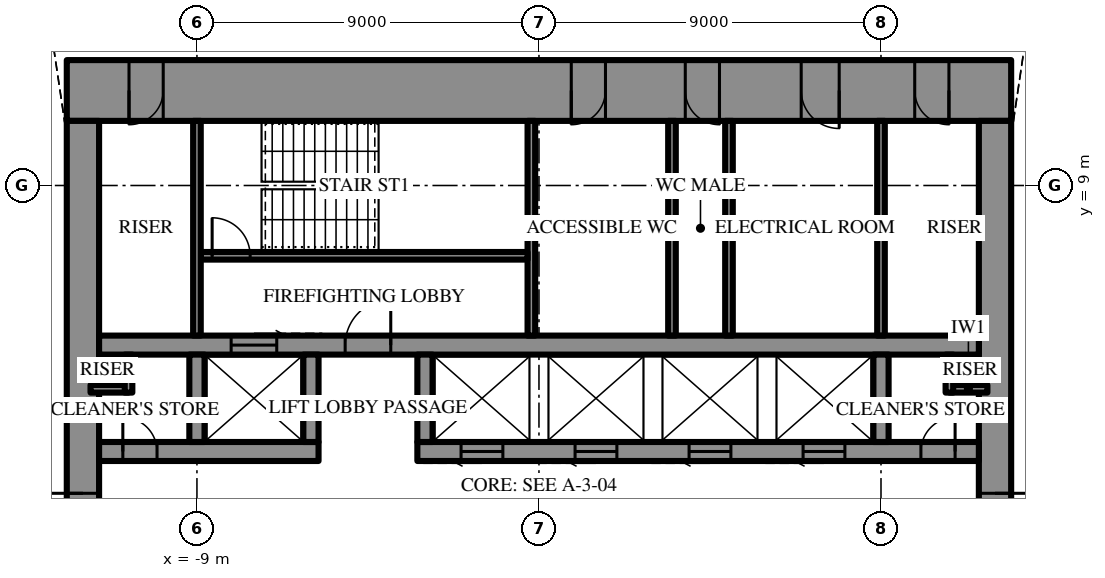
"""IFC4 building model, lengths in metres.
Left out: names, types, materials, properties, quantities, classifications, styles, units other than length and angle.
Written with IfcOpenShell. Run it as: python <this file> out.ifc"""

import sys

from ifc_helpers import new_model, si_unit, direction, frame, frame_2d, origin, place, context, subcontext, project, spatial, rectangle, extrude, element, fill, save


model = new_model("IFC4")
c1 = context("Model", 3, precision=1e-05, world=origin(), true_north=direction((0.0, 1.0)))
c2 = subcontext(c1, "Body", "Model", "MODEL_VIEW")
j1 = project(units=[si_unit("LENGTHUNIT", "METRE"), si_unit("PLANEANGLEUNIT", "RADIAN")], contexts=[c1])
p1 = place(None, origin())
s1 = spatial("IfcSite", under=j1, at=p1, CompositionType="ELEMENT")
p2 = place(p1, origin())
s2 = spatial("IfcBuilding", under=s1, at=p2, CompositionType="ELEMENT")
p3 = place(p2, frame((0.0, 0.0, 332.5)))
s3 = spatial("IfcBuildingStorey", under=s2, at=p3, CompositionType="ELEMENT", Elevation=332.5)
p4 = place(p3, frame((-12.425, 11.5, 0.0), z_axis=(0.0, 0.0, 1.0), x_axis=(1.0, 0.0, 0.0)))
e1 = element("IfcWall", 1, at=p4, inside=s3, PredefinedType="SHEAR", context=c2, shape_type="SweptSolid", body=[
    extrude(rectangle(XDim=24.85, YDim=1.6, at=frame_2d((12.425, 0.0))), origin(), (0.0, 0.0, 1.0), 4.2),
])
p5 = place(p4, frame((13.275, 0.0, 0.0)))
e2 = element("IfcOpeningElement", 2, at=p5, cuts=e1, PredefinedType="OPENING", context=c2, shape_type="SweptSolid", body=[
    extrude(rectangle(XDim=0.9, YDim=2.2, at=frame_2d((0.45, 1.1))), frame((0.0, 0.81, 0.0), z_axis=(0.0, -1.0, 0.0), x_axis=(1.0, 0.0, 0.0)), (0.0, 0.0, 1.0), 1.62),
])
p6 = place(p4, frame((16.275, 0.0, 0.0)))
e3 = element("IfcOpeningElement", 3, at=p6, cuts=e1, PredefinedType="OPENING", context=c2, shape_type="SweptSolid", body=[
    extrude(rectangle(XDim=0.9, YDim=2.2, at=frame_2d((0.45, 1.1))), frame((0.0, 0.81, 0.0), z_axis=(0.0, -1.0, 0.0), x_axis=(1.0, 0.0, 0.0)), (0.0, 0.0, 1.0), 1.62),
])
p7 = place(p4, frame((19.325, 0.0, 0.0)))
e4 = element("IfcOpeningElement", 4, at=p7, cuts=e1, PredefinedType="OPENING", context=c2, shape_type="SweptSolid", body=[
    extrude(rectangle(XDim=1.0, YDim=2.2, at=frame_2d((0.5, 1.1))), frame((0.0, 0.81, 0.0), z_axis=(0.0, -1.0, 0.0), x_axis=(1.0, 0.0, 0.0)), (0.0, 0.0, 1.0), 1.62),
])
p8 = place(p4, frame((1.637, 0.0, 0.0)))
e5 = element("IfcOpeningElement", 5, at=p8, cuts=e1, PredefinedType="OPENING", context=c2, shape_type="SweptSolid", body=[
    extrude(rectangle(XDim=0.9, YDim=2.2, at=frame_2d((0.45, 1.1))), frame((0.0, 0.81, 0.0), z_axis=(0.0, -1.0, 0.0), x_axis=(1.0, 0.0, 0.0)), (0.0, 0.0, 1.0), 1.62),
])
p9 = place(p4, frame((22.312, 0.0, 0.0)))
e6 = element("IfcOpeningElement", 6, at=p9, cuts=e1, PredefinedType="OPENING", context=c2, shape_type="SweptSolid", body=[
    extrude(rectangle(XDim=0.9, YDim=2.2, at=frame_2d((0.45, 1.1))), frame((0.0, 0.81, 0.0), z_axis=(0.0, -1.0, 0.0), x_axis=(1.0, 0.0, 0.0)), (0.0, 0.0, 1.0), 1.62),
])
p10 = place(p3, frame((12.0, -10.7, 0.0), z_axis=(0.0, 0.0, 1.0), x_axis=(0.0, 1.0, 0.0)))
e7 = element("IfcWall", 7, at=p10, inside=s3, PredefinedType="SHEAR", context=c2, shape_type="SweptSolid", body=[
    extrude(rectangle(XDim=21.4, YDim=0.85, at=frame_2d((10.7, 0.0))), origin(), (0.0, 0.0, 1.0), 4.2),
])
p11 = place(p10, frame((9.8, 0.0, 0.0)))
e8 = element("IfcOpeningElement", 8, at=p11, cuts=e7, PredefinedType="OPENING", context=c2, shape_type="SweptSolid", body=[
    extrude(rectangle(XDim=1.8, YDim=2.4, at=frame_2d((0.9, 1.2))), frame((0.0, 0.435, 0.0), z_axis=(0.0, -1.0, 0.0), x_axis=(1.0, 0.0, 0.0)), (0.0, 0.0, 1.0), 0.87),
])
p12 = place(p3, frame((-12.0, 10.7, 0.0), z_axis=(0.0, 0.0, 1.0), x_axis=(0.0, -1.0, 0.0)))
e9 = element("IfcWall", 9, at=p12, inside=s3, PredefinedType="SHEAR", context=c2, shape_type="SweptSolid", body=[
    extrude(rectangle(XDim=21.4, YDim=0.85, at=frame_2d((10.7, 0.0))), origin(), (0.0, 0.0, 1.0), 4.2),
])
p13 = place(p12, frame((9.8, 0.0, 0.0)))
e10 = element("IfcOpeningElement", 10, at=p13, cuts=e9, PredefinedType="OPENING", context=c2, shape_type="SweptSolid", body=[
    extrude(rectangle(XDim=1.8, YDim=2.4, at=frame_2d((0.9, 1.2))), frame((0.0, 0.435, 0.0), z_axis=(0.0, -1.0, 0.0), x_axis=(1.0, 0.0, 0.0)), (0.0, 0.0, 1.0), 0.87),
])
p14 = place(p3, frame((-11.575, 2.0, 0.0), z_axis=(0.0, 0.0, 1.0), x_axis=(1.0, 0.0, 0.0)))
e11 = element("IfcWall", 11, at=p14, inside=s3, PredefinedType="SHEAR", context=c2, shape_type="SweptSolid", body=[
    extrude(rectangle(XDim=5.775, YDim=0.5, at=frame_2d((2.887, 0.0))), origin(), (0.0, 0.0, 1.0), 4.2),
])
p15 = place(p14, frame((0.625, 0.0, 0.0)))
e12 = element("IfcOpeningElement", 12, at=p15, cuts=e11, PredefinedType="OPENING", context=c2, shape_type="SweptSolid", body=[
    extrude(rectangle(XDim=0.9, YDim=2.2, at=frame_2d((0.45, 1.1))), frame((0.0, 0.26, 0.0), z_axis=(0.0, -1.0, 0.0), x_axis=(1.0, 0.0, 0.0)), (0.0, 0.0, 1.0), 0.52),
])
p16 = place(p3, frame((-3.2, 2.0, 0.0), z_axis=(0.0, 0.0, 1.0), x_axis=(1.0, 0.0, 0.0)))
e13 = element("IfcWall", 13, at=p16, inside=s3, PredefinedType="SHEAR", context=c2, shape_type="SweptSolid", body=[
    extrude(rectangle(XDim=14.775, YDim=0.5, at=frame_2d((7.387, 0.0))), origin(), (0.0, 0.0, 1.0), 4.2),
])
p17 = place(p16, frame((13.25, 0.0, 0.0)))
e14 = element("IfcOpeningElement", 14, at=p17, cuts=e13, PredefinedType="OPENING", context=c2, shape_type="SweptSolid", body=[
    extrude(rectangle(XDim=0.9, YDim=2.2, at=frame_2d((0.45, 1.1))), frame((0.0, 0.26, 0.0), z_axis=(0.0, -1.0, 0.0), x_axis=(1.0, 0.0, 0.0)), (0.0, 0.0, 1.0), 0.52),
])
p18 = place(p16, frame((1.15, 0.0, 0.0)))
e15 = element("IfcOpeningElement", 15, at=p18, cuts=e13, PredefinedType="OPENING", context=c2, shape_type="SweptSolid", body=[
    extrude(rectangle(XDim=1.1, YDim=2.2, at=frame_2d((0.55, 1.1))), frame((0.0, 0.26, 0.0), z_axis=(0.0, -1.0, 0.0), x_axis=(1.0, 0.0, 0.0)), (0.0, 0.0, 1.0), 0.52),
])
p19 = place(p16, frame((4.15, 0.0, 0.0)))
e16 = element("IfcOpeningElement", 16, at=p19, cuts=e13, PredefinedType="OPENING", context=c2, shape_type="SweptSolid", body=[
    extrude(rectangle(XDim=1.1, YDim=2.2, at=frame_2d((0.55, 1.1))), frame((0.0, 0.26, 0.0), z_axis=(0.0, -1.0, 0.0), x_axis=(1.0, 0.0, 0.0)), (0.0, 0.0, 1.0), 0.52),
])
p20 = place(p16, frame((7.15, 0.0, 0.0)))
e17 = element("IfcOpeningElement", 17, at=p20, cuts=e13, PredefinedType="OPENING", context=c2, shape_type="SweptSolid", body=[
    extrude(rectangle(XDim=1.1, YDim=2.2, at=frame_2d((0.55, 1.1))), frame((0.0, 0.26, 0.0), z_axis=(0.0, -1.0, 0.0), x_axis=(1.0, 0.0, 0.0)), (0.0, 0.0, 1.0), 0.52),
])
p21 = place(p16, frame((10.15, 0.0, 0.0)))
e18 = element("IfcOpeningElement", 18, at=p21, cuts=e13, PredefinedType="OPENING", context=c2, shape_type="SweptSolid", body=[
    extrude(rectangle(XDim=1.1, YDim=2.2, at=frame_2d((0.55, 1.1))), frame((0.0, 0.26, 0.0), z_axis=(0.0, -1.0, 0.0), x_axis=(1.0, 0.0, 0.0)), (0.0, 0.0, 1.0), 0.52),
])
p22 = place(p3, frame((-11.575, 4.8, 0.0), z_axis=(0.0, 0.0, 1.0), x_axis=(1.0, 0.0, 0.0)))
e19 = element("IfcWall", 19, at=p22, inside=s3, PredefinedType="SHEAR", context=c2, shape_type="SweptSolid", body=[
    extrude(rectangle(XDim=23.15, YDim=0.5, at=frame_2d((11.575, 0.0))), origin(), (0.0, 0.0, 1.0), 4.2),
])
p23 = place(p22, frame((6.475, 0.0, 0.0)))
e20 = element("IfcOpeningElement", 20, at=p23, cuts=e19, PredefinedType="OPENING", context=c2, shape_type="SweptSolid", body=[
    extrude(rectangle(XDim=1.2, YDim=2.2, at=frame_2d((0.6, 1.1))), frame((0.0, 0.26, 0.0), z_axis=(0.0, -1.0, 0.0), x_axis=(1.0, 0.0, 0.0)), (0.0, 0.0, 1.0), 0.52),
])
p24 = place(p22, frame((3.475, 0.0, 0.0)))
e21 = element("IfcOpeningElement", 21, at=p24, cuts=e19, PredefinedType="OPENING", context=c2, shape_type="SweptSolid", body=[
    extrude(rectangle(XDim=1.2, YDim=2.2, at=frame_2d((0.6, 1.1))), frame((0.0, 0.26, 0.0), z_axis=(0.0, -1.0, 0.0), x_axis=(1.0, 0.0, 0.0)), (0.0, 0.0, 1.0), 0.52),
])
for number, where, z_axis, x_axis in (
    (22, (-9.0, 2.25, 0.0), (0.0, 0.0, 1.0), (0.0, 1.0, 0.0)),
    (23, (-6.0, 2.25, 0.0), (0.0, 0.0, 1.0), (0.0, 1.0, 0.0)),
    (24, (-3.0, 2.25, 0.0), (0.0, 0.0, 1.0), (0.0, 1.0, 0.0)),
    (25, (9.0, 2.25, 0.0), (0.0, 0.0, 1.0), (0.0, 1.0, 0.0)),
):
    element("IfcWall", number, at=place(p3, frame(where, z_axis=z_axis, x_axis=x_axis)), inside=s3, PredefinedType="SHEAR", context=c2, shape_type="SweptSolid", body=[
        extrude(rectangle(XDim=2.3, YDim=0.4, at=frame_2d((1.15, 0.0))), origin(), (0.0, 0.0, 1.0), 4.2),
    ])
p25 = place(p3, frame((-0.2, 5.05, 0.0), z_axis=(0.0, 0.0, 1.0), x_axis=(0.0, 1.0, 0.0)))
e26 = element("IfcWall", 26, at=p25, inside=s3, PredefinedType="SHEAR", context=c2, shape_type="SweptSolid", body=[
    extrude(rectangle(XDim=5.65, YDim=0.2, at=frame_2d((2.825, 0.0))), origin(), (0.0, 0.0, 1.0), 4.2),
])
p26 = place(p3, frame((-8.9, 7.15, 0.0), z_axis=(0.0, 0.0, 1.0), x_axis=(1.0, 0.0, 0.0)))
e27 = element("IfcWall", 27, at=p26, inside=s3, PredefinedType="SHEAR", context=c2, shape_type="SweptSolid", body=[
    extrude(rectangle(XDim=8.6, YDim=0.2, at=frame_2d((4.3, 0.0))), origin(), (0.0, 0.0, 1.0), 4.2),
])
p27 = place(p26, frame((0.3, 0.0, 0.0)))
e28 = element("IfcOpeningElement", 28, at=p27, cuts=e27, PredefinedType="OPENING", context=c2, shape_type="SweptSolid", body=[
    extrude(rectangle(XDim=1.0, YDim=2.2, at=frame_2d((0.5, 1.1))), frame((0.0, 0.11, 0.0), z_axis=(0.0, -1.0, 0.0), x_axis=(1.0, 0.0, 0.0)), (0.0, 0.0, 1.0), 0.22),
])
for number, where, z_axis, x_axis in (
    (29, (-9.0, 5.05, 0.0), (0.0, 0.0, 1.0), (0.0, 1.0, 0.0)),
    (30, (9.0, 5.05, 0.0), (0.0, 0.0, 1.0), (0.0, 1.0, 0.0)),
    (31, (3.5, 5.05, 0.0), (0.0, 0.0, 1.0), (0.0, 1.0, 0.0)),
    (32, (5.0, 5.05, 0.0), (0.0, 0.0, 1.0), (0.0, 1.0, 0.0)),
):
    element("IfcWall", number, at=place(p3, frame(where, z_axis=z_axis, x_axis=x_axis)), inside=s3, PredefinedType="PARTITIONING", context=c2, shape_type="SweptSolid", body=[
        extrude(rectangle(XDim=5.65, YDim=0.2, at=frame_2d((2.825, 0.0))), origin(), (0.0, 0.0, 1.0), 4.0),
    ])
for number, where, z_axis, x_axis in (
    (33, (-11.8, 3.65, 0.0), (0.0, 0.0, 1.0), (1.0, 0.0, 0.0)),
    (34, (-10.8, 3.55, 0.0), (0.0, 0.0, 1.0), (0.0, 1.0, 0.0)),
    (35, (10.8, 3.65, 0.0), (0.0, 0.0, 1.0), (1.0, 0.0, 0.0)),
    (36, (10.8, 3.55, 0.0), (0.0, 0.0, 1.0), (0.0, 1.0, 0.0)),
):
    element("IfcWall", number, at=place(p3, frame(where, z_axis=z_axis, x_axis=x_axis)), inside=s3, PredefinedType="PARTITIONING", context=c2, shape_type="SweptSolid", body=[
        extrude(rectangle(XDim=1.0, YDim=0.2, at=frame_2d((0.5, 0.0))), origin(), (0.0, 0.0, 1.0), 4.0),
    ])
p28 = place(p11, frame((1.8, 0.0, 0.0), z_axis=(0.0, 0.0, 1.0), x_axis=(-1.0, 0.0, 0.0)))
e37 = element("IfcDoor", 37, at=p28, inside=s3, OperationType="DOUBLE_DOOR_SINGLE_SWING", PredefinedType="DOOR", context=c2, shape_type="SweptSolid", body=[
    extrude(rectangle(XDim=1.8, YDim=2.4, at=frame_2d((0.9, 1.2))), frame((0.0, 0.025, 0.0), z_axis=(0.0, -1.0, 0.0), x_axis=(1.0, 0.0, 0.0)), (0.0, 0.0, 1.0), 0.05),
])
fill(e8, e37)
p29 = place(p13, frame((1.8, 0.0, 0.0), z_axis=(0.0, 0.0, 1.0), x_axis=(-1.0, 0.0, 0.0)))
e38 = element("IfcDoor", 38, at=p29, inside=s3, OperationType="DOUBLE_DOOR_SINGLE_SWING", PredefinedType="DOOR", context=c2, shape_type="SweptSolid", body=[
    extrude(rectangle(XDim=1.8, YDim=2.4, at=frame_2d((0.9, 1.2))), frame((0.0, 0.025, 0.0), z_axis=(0.0, -1.0, 0.0), x_axis=(1.0, 0.0, 0.0)), (0.0, 0.0, 1.0), 0.05),
])
fill(e10, e38)
p30 = place(p23, origin())
e39 = element("IfcDoor", 39, at=p30, inside=s3, OperationType="SINGLE_SWING_LEFT", PredefinedType="DOOR", context=c2, shape_type="SweptSolid", body=[
    extrude(rectangle(XDim=1.2, YDim=2.2, at=frame_2d((0.6, 1.1))), frame((0.0, 0.025, 0.0), z_axis=(0.0, -1.0, 0.0), x_axis=(1.0, 0.0, 0.0)), (0.0, 0.0, 1.0), 0.05),
])
fill(e20, e39)
p31 = place(p27, origin())
e40 = element("IfcDoor", 40, at=p31, inside=s3, OperationType="SINGLE_SWING_RIGHT", PredefinedType="DOOR", context=c2, shape_type="SweptSolid", body=[
    extrude(rectangle(XDim=1.0, YDim=2.2, at=frame_2d((0.5, 1.1))), frame((0.0, 0.025, 0.0), z_axis=(0.0, -1.0, 0.0), x_axis=(1.0, 0.0, 0.0)), (0.0, 0.0, 1.0), 0.05),
])
fill(e28, e40)
p32 = place(p5, frame((0.9, 0.0, 0.0), z_axis=(0.0, 0.0, 1.0), x_axis=(-1.0, 0.0, 0.0)))
e41 = element("IfcDoor", 41, at=p32, inside=s3, OperationType="SINGLE_SWING_LEFT", PredefinedType="DOOR", context=c2, shape_type="SweptSolid", body=[
    extrude(rectangle(XDim=0.9, YDim=2.2, at=frame_2d((0.45, 1.1))), frame((0.0, 0.025, 0.0), z_axis=(0.0, -1.0, 0.0), x_axis=(1.0, 0.0, 0.0)), (0.0, 0.0, 1.0), 0.05),
])
fill(e2, e41)
p33 = place(p6, frame((0.9, 0.0, 0.0), z_axis=(0.0, 0.0, 1.0), x_axis=(-1.0, 0.0, 0.0)))
e42 = element("IfcDoor", 42, at=p33, inside=s3, OperationType="SINGLE_SWING_RIGHT", PredefinedType="DOOR", context=c2, shape_type="SweptSolid", body=[
    extrude(rectangle(XDim=0.9, YDim=2.2, at=frame_2d((0.45, 1.1))), frame((0.0, 0.025, 0.0), z_axis=(0.0, -1.0, 0.0), x_axis=(1.0, 0.0, 0.0)), (0.0, 0.0, 1.0), 0.05),
])
fill(e3, e42)
p34 = place(p7, frame((1.0, 0.0, 0.0), z_axis=(0.0, 0.0, 1.0), x_axis=(-1.0, 0.0, 0.0)))
e43 = element("IfcDoor", 43, at=p34, inside=s3, OperationType="SINGLE_SWING_RIGHT", PredefinedType="DOOR", context=c2, shape_type="SweptSolid", body=[
    extrude(rectangle(XDim=1.0, YDim=2.2, at=frame_2d((0.5, 1.1))), frame((0.0, 0.025, 0.0), z_axis=(0.0, -1.0, 0.0), x_axis=(1.0, 0.0, 0.0)), (0.0, 0.0, 1.0), 0.05),
])
fill(e4, e43)
p35 = place(p8, frame((0.9, 0.0, 0.0), z_axis=(0.0, 0.0, 1.0), x_axis=(-1.0, 0.0, 0.0)))
e44 = element("IfcDoor", 44, at=p35, inside=s3, OperationType="SINGLE_SWING_LEFT", PredefinedType="DOOR", context=c2, shape_type="SweptSolid", body=[
    extrude(rectangle(XDim=0.9, YDim=2.2, at=frame_2d((0.45, 1.1))), frame((0.0, 0.025, 0.0), z_axis=(0.0, -1.0, 0.0), x_axis=(1.0, 0.0, 0.0)), (0.0, 0.0, 1.0), 0.05),
])
fill(e5, e44)
p36 = place(p9, frame((0.9, 0.0, 0.0), z_axis=(0.0, 0.0, 1.0), x_axis=(-1.0, 0.0, 0.0)))
e45 = element("IfcDoor", 45, at=p36, inside=s3, OperationType="SINGLE_SWING_RIGHT", PredefinedType="DOOR", context=c2, shape_type="SweptSolid", body=[
    extrude(rectangle(XDim=0.9, YDim=2.2, at=frame_2d((0.45, 1.1))), frame((0.0, 0.025, 0.0), z_axis=(0.0, -1.0, 0.0), x_axis=(1.0, 0.0, 0.0)), (0.0, 0.0, 1.0), 0.05),
])
fill(e6, e45)
p37 = place(p15, origin())
e46 = element("IfcDoor", 46, at=p37, inside=s3, OperationType="SINGLE_SWING_RIGHT", PredefinedType="DOOR", context=c2, shape_type="SweptSolid", body=[
    extrude(rectangle(XDim=0.9, YDim=2.2, at=frame_2d((0.45, 1.1))), frame((0.0, 0.025, 0.0), z_axis=(0.0, -1.0, 0.0), x_axis=(1.0, 0.0, 0.0)), (0.0, 0.0, 1.0), 0.05),
])
fill(e12, e46)
p38 = place(p17, origin())
e47 = element("IfcDoor", 47, at=p38, inside=s3, OperationType="SINGLE_SWING_LEFT", PredefinedType="DOOR", context=c2, shape_type="SweptSolid", body=[
    extrude(rectangle(XDim=0.9, YDim=2.2, at=frame_2d((0.45, 1.1))), frame((0.0, 0.025, 0.0), z_axis=(0.0, -1.0, 0.0), x_axis=(1.0, 0.0, 0.0)), (0.0, 0.0, 1.0), 0.05),
])
fill(e14, e47)
p39 = place(p24, origin())
e48 = element("IfcDoor", 48, at=p39, inside=s3, OperationType="SLIDING_TO_LEFT", PredefinedType="DOOR", context=c2, shape_type="SweptSolid", body=[
    extrude(rectangle(XDim=1.2, YDim=2.2, at=frame_2d((0.6, 1.1))), frame((0.0, 0.025, 0.0), z_axis=(0.0, -1.0, 0.0), x_axis=(1.0, 0.0, 0.0)), (0.0, 0.0, 1.0), 0.05),
])
fill(e21, e48)
p40 = place(p18, frame((1.1, 0.0, 0.0), z_axis=(0.0, 0.0, 1.0), x_axis=(-1.0, 0.0, 0.0)))
e49 = element("IfcDoor", 49, at=p40, inside=s3, OperationType="SLIDING_TO_LEFT", PredefinedType="DOOR", context=c2, shape_type="SweptSolid", body=[
    extrude(rectangle(XDim=1.1, YDim=2.2, at=frame_2d((0.55, 1.1))), frame((0.0, 0.025, 0.0), z_axis=(0.0, -1.0, 0.0), x_axis=(1.0, 0.0, 0.0)), (0.0, 0.0, 1.0), 0.05),
])
fill(e15, e49)
p41 = place(p19, frame((1.1, 0.0, 0.0), z_axis=(0.0, 0.0, 1.0), x_axis=(-1.0, 0.0, 0.0)))
e50 = element("IfcDoor", 50, at=p41, inside=s3, OperationType="SLIDING_TO_LEFT", PredefinedType="DOOR", context=c2, shape_type="SweptSolid", body=[
    extrude(rectangle(XDim=1.1, YDim=2.2, at=frame_2d((0.55, 1.1))), frame((0.0, 0.025, 0.0), z_axis=(0.0, -1.0, 0.0), x_axis=(1.0, 0.0, 0.0)), (0.0, 0.0, 1.0), 0.05),
])
fill(e16, e50)
p42 = place(p20, frame((1.1, 0.0, 0.0), z_axis=(0.0, 0.0, 1.0), x_axis=(-1.0, 0.0, 0.0)))
e51 = element("IfcDoor", 51, at=p42, inside=s3, OperationType="SLIDING_TO_LEFT", PredefinedType="DOOR", context=c2, shape_type="SweptSolid", body=[
    extrude(rectangle(XDim=1.1, YDim=2.2, at=frame_2d((0.55, 1.1))), frame((0.0, 0.025, 0.0), z_axis=(0.0, -1.0, 0.0), x_axis=(1.0, 0.0, 0.0)), (0.0, 0.0, 1.0), 0.05),
])
fill(e17, e51)
p43 = place(p21, frame((1.1, 0.0, 0.0), z_axis=(0.0, 0.0, 1.0), x_axis=(-1.0, 0.0, 0.0)))
e52 = element("IfcDoor", 52, at=p43, inside=s3, OperationType="SLIDING_TO_LEFT", PredefinedType="DOOR", context=c2, shape_type="SweptSolid", body=[
    extrude(rectangle(XDim=1.1, YDim=2.2, at=frame_2d((0.55, 1.1))), frame((0.0, 0.025, 0.0), z_axis=(0.0, -1.0, 0.0), x_axis=(1.0, 0.0, 0.0)), (0.0, 0.0, 1.0), 0.05),
])
fill(e18, e52)
save(model, sys.argv[1])
